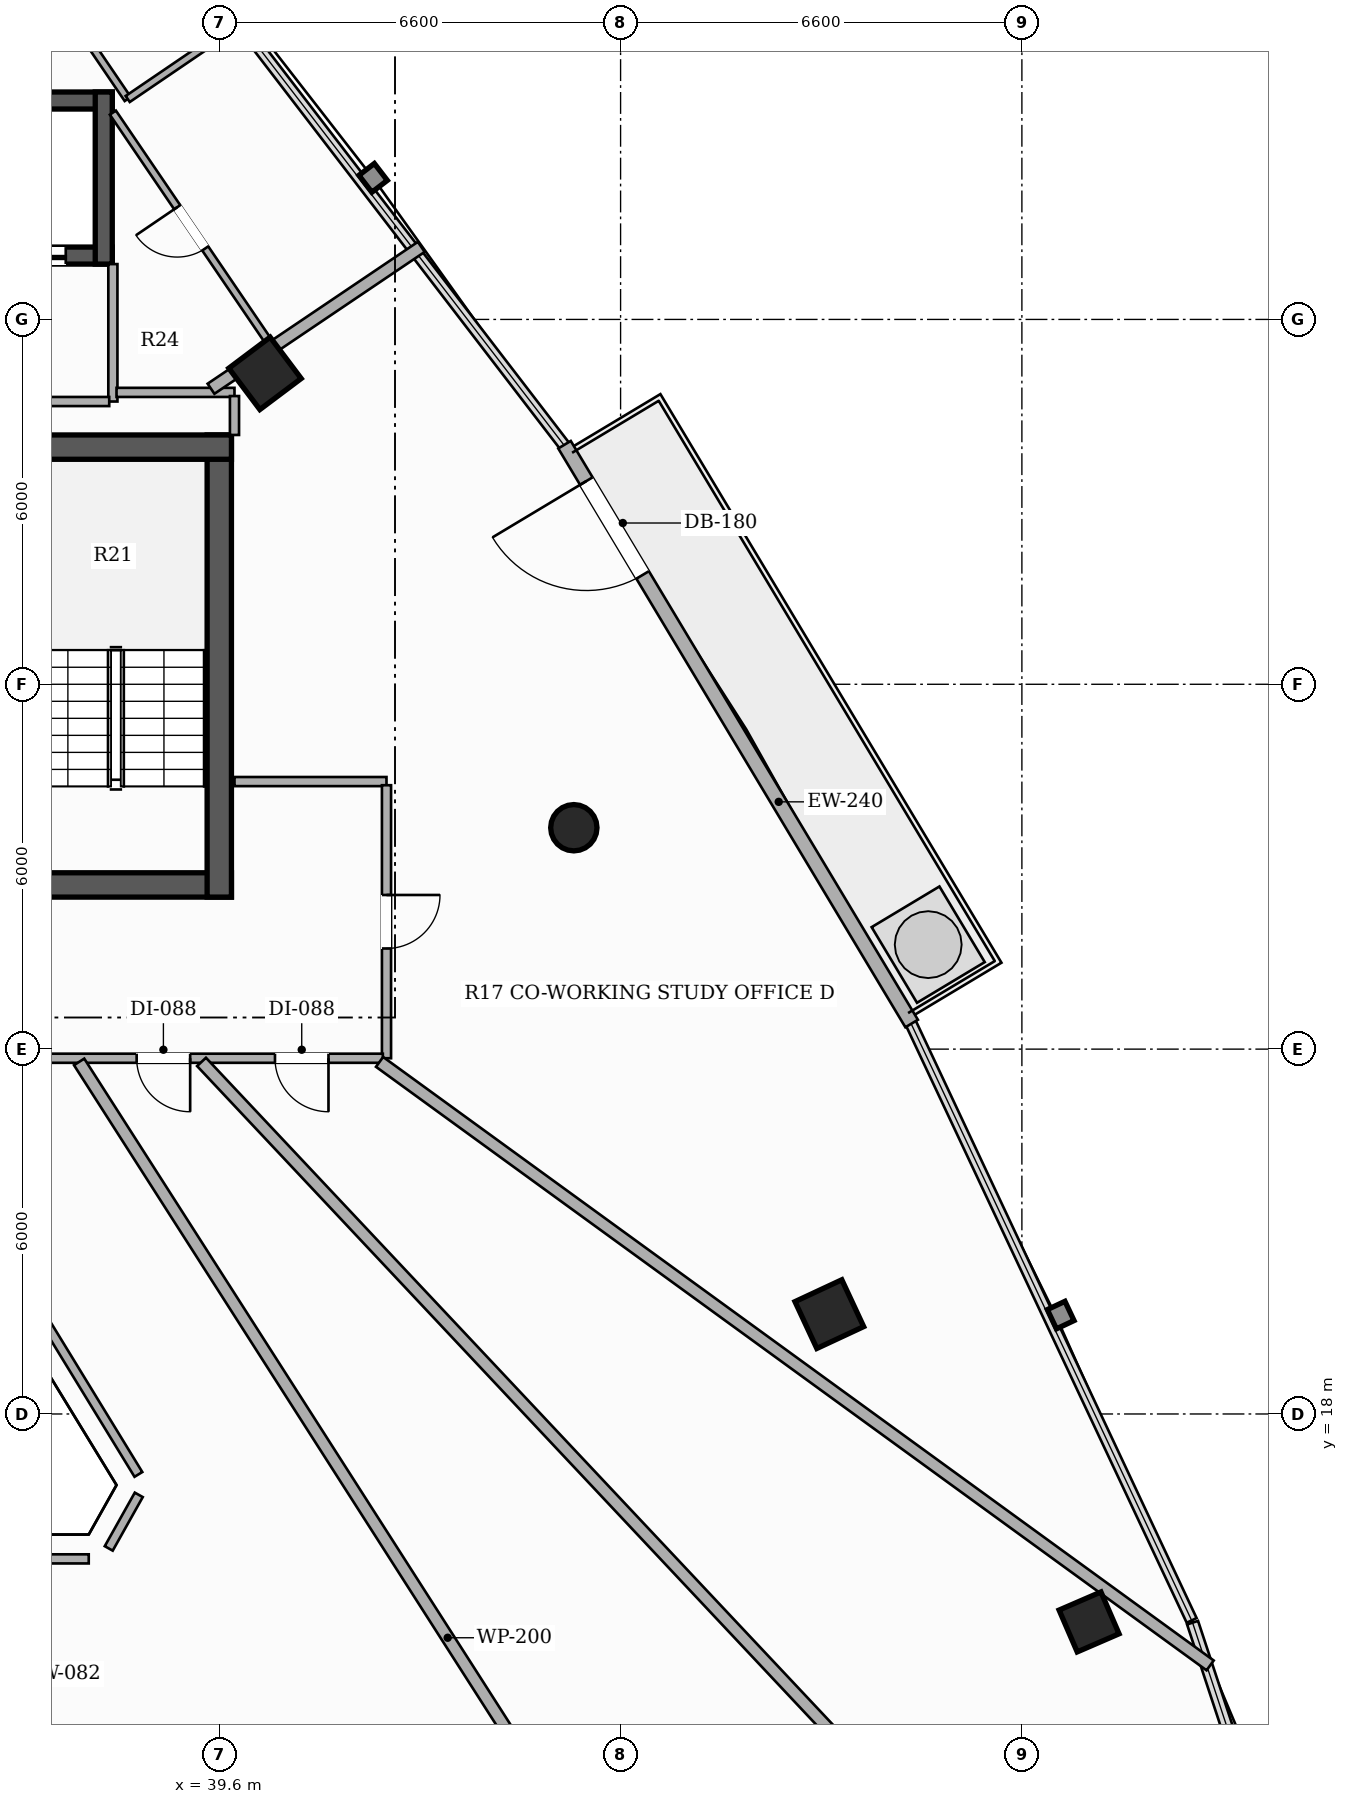
"""IFC4 building model, lengths in metres.
Left out: names, types, materials, properties, quantities, classifications, styles, units other than length and angle.
Written with IfcOpenShell. Run it as: python <this file> out.ifc"""

import sys

from ifc_helpers import new_model, si_unit, direction, frame, frame_2d, origin, origin_2d, place, context, subcontext, project, spatial, rectangle, hollow_rectangle, hollow_circle, extrude, element, fill, save


model = new_model("IFC4")
c1 = context("Model", 3, precision=1e-05, world=origin(), true_north=direction((0.0, 1.0)))
c2 = subcontext(c1, "Body", "Model", "MODEL_VIEW")
j1 = project(units=[si_unit("LENGTHUNIT", "METRE"), si_unit("PLANEANGLEUNIT", "RADIAN")], contexts=[c1])
p1 = place(None, origin())
s1 = spatial("IfcSite", under=j1, at=p1, CompositionType="ELEMENT")
p2 = place(p1, origin())
s2 = spatial("IfcBuilding", under=s1, at=p2, CompositionType="ELEMENT")
p3 = place(p2, frame((0.0, 0.0, 167.15)))
s3 = spatial("IfcBuildingStorey", under=s2, at=p3, CompositionType="ELEMENT", Elevation=167.15)
p4 = place(p3, frame((26.2, 26.7, 0.0), z_axis=(0.0, 0.0, 1.0), x_axis=(1.0, 0.0, 0.0)))
e1 = element("IfcWall", 1, at=p4, inside=s3, PredefinedType="SHEAR", context=c2, shape_type="SweptSolid", body=[
    extrude(rectangle(XDim=13.6, YDim=0.4, at=frame_2d((6.8, 0.0))), origin(), (0.0, 0.0, 1.0), 3.3),
])
p5 = place(p4, frame((4.35, 0.0, 0.0)))
e2 = element("IfcOpeningElement", 2, at=p5, cuts=e1, PredefinedType="OPENING", context=c2, shape_type="SweptSolid", body=[
    extrude(rectangle(XDim=1.05, YDim=2.15, at=frame_2d((0.525, 1.075))), frame((0.0, 0.21, 0.0), z_axis=(0.0, -1.0, 0.0), x_axis=(1.0, 0.0, 0.0)), (0.0, 0.0, 1.0), 0.42),
])
p6 = place(p4, frame((8.3, 0.0, 0.0)))
e3 = element("IfcOpeningElement", 3, at=p6, cuts=e1, PredefinedType="OPENING", context=c2, shape_type="SweptSolid", body=[
    extrude(rectangle(XDim=1.05, YDim=2.15, at=frame_2d((0.525, 1.075))), frame((0.0, 0.21, 0.0), z_axis=(0.0, -1.0, 0.0), x_axis=(1.0, 0.0, 0.0)), (0.0, 0.0, 1.0), 0.42),
])
p7 = place(p3, frame((39.6, 26.5, 0.0), z_axis=(0.0, 0.0, 1.0), x_axis=(0.0, 1.0, 0.0)))
e4 = element("IfcWall", 4, at=p7, inside=s3, PredefinedType="SHEAR", context=c2, shape_type="SweptSolid", body=[
    extrude(rectangle(XDim=7.6, YDim=0.4, at=frame_2d((3.8, 0.0))), origin(), (0.0, 0.0, 1.0), 3.3),
])
p8 = place(p3, frame((36.12, 33.9, 0.0), z_axis=(0.0, 0.0, 1.0), x_axis=(1.0, 0.0, 0.0)))
e5 = element("IfcWall", 5, at=p8, inside=s3, PredefinedType="SHEAR", context=c2, shape_type="SweptSolid", body=[
    extrude(rectangle(XDim=3.68, YDim=0.4, at=frame_2d((1.84, 0.0))), origin(), (0.0, 0.0, 1.0), 3.3),
])
p9 = place(p3, frame((37.84, 37.05, 0.0), z_axis=(0.0, 0.0, 1.0), x_axis=(-1.0, 0.0, 0.0)))
e6 = element("IfcWall", 6, at=p9, inside=s3, PredefinedType="SHEAR", context=c2, shape_type="SweptSolid", body=[
    extrude(rectangle(XDim=9.68, YDim=0.28, at=frame_2d((4.84, 0.0))), origin(), (0.0, 0.0, 1.0), 3.3),
])
p10 = place(p9, frame((7.815, 0.0, 0.0)))
e7 = element("IfcOpeningElement", 7, at=p10, cuts=e6, PredefinedType="OPENING", context=c2, shape_type="SweptSolid", body=[
    extrude(rectangle(XDim=1.1, YDim=2.2, at=frame_2d((0.55, 1.1))), frame((0.0, 0.15, 0.0), z_axis=(0.0, -1.0, 0.0), x_axis=(1.0, 0.0, 0.0)), (0.0, 0.0, 1.0), 0.3),
])
p11 = place(p9, frame((0.765, 0.0, 0.0)))
e8 = element("IfcOpeningElement", 8, at=p11, cuts=e6, PredefinedType="OPENING", context=c2, shape_type="SweptSolid", body=[
    extrude(rectangle(XDim=1.1, YDim=2.2, at=frame_2d((0.55, 1.1))), frame((0.0, 0.15, 0.0), z_axis=(0.0, -1.0, 0.0), x_axis=(1.0, 0.0, 0.0)), (0.0, 0.0, 1.0), 0.3),
])
p12 = place(p3, frame((28.16, 39.6, 0.0), z_axis=(0.0, 0.0, 1.0), x_axis=(1.0, 0.0, 0.0)))
e9 = element("IfcWall", 9, at=p12, inside=s3, PredefinedType="SHEAR", context=c2, shape_type="SweptSolid", body=[
    extrude(rectangle(XDim=9.68, YDim=0.28, at=frame_2d((4.84, 0.0))), origin(), (0.0, 0.0, 1.0), 3.3),
])
p13 = place(p3, frame((37.7, 36.91, 0.0), z_axis=(0.0, 0.0, 1.0), x_axis=(0.0, 1.0, 0.0)))
e10 = element("IfcWall", 10, at=p13, inside=s3, PredefinedType="SHEAR", context=c2, shape_type="SweptSolid", body=[
    extrude(rectangle(XDim=2.83, YDim=0.28, at=frame_2d((1.415, 0.0))), origin(), (0.0, 0.0, 1.0), 3.3),
])
p14 = place(p3, frame((49.633, 19.642, 0.0), z_axis=(0.0, 0.0, 1.0), x_axis=(-0.422618261741, 0.906307787037, 0.0)))
e11 = element("IfcColumn", 11, at=p14, inside=s3, PredefinedType="COLUMN", context=c2, shape_type="SweptSolid", body=[
    extrude(hollow_rectangle(XDim=0.85, YDim=0.85, WallThickness=0.028, at=origin_2d()), origin(), (0.0, 0.0, 1.0), 3.3),
])
p15 = place(p3, frame((45.431, 27.641, 0.0), z_axis=(0.0, 0.0, 1.0), x_axis=(1.0, 0.0, 0.0)))
e12 = element("IfcColumn", 12, at=p15, inside=s3, PredefinedType="COLUMN", context=c2, shape_type="SweptSolid", body=[
    extrude(hollow_circle(Radius=0.381, WallThickness=0.022, at=origin_2d()), origin(), (0.0, 0.0, 1.0), 3.3),
])
p16 = place(p3, frame((40.352, 35.113, 0.0), z_axis=(0.0, 0.0, 1.0), x_axis=(-0.600420225326, 0.799684658487, 0.0)))
e13 = element("IfcColumn", 13, at=p16, inside=s3, PredefinedType="COLUMN", context=c2, shape_type="SweptSolid", body=[
    extrude(hollow_rectangle(XDim=0.85, YDim=0.85, WallThickness=0.028, at=origin_2d()), origin(), (0.0, 0.0, 1.0), 3.3),
])
p17 = place(p3, frame((53.905, 14.58, 0.0), z_axis=(0.0, 0.0, 1.0), x_axis=(-0.397147890635, 0.917754625684, 0.0)))
e14 = element("IfcColumn", 14, at=p17, inside=s3, PredefinedType="COLUMN", context=c2, shape_type="SweptSolid", body=[
    extrude(hollow_rectangle(XDim=0.75, YDim=0.75, WallThickness=0.025, at=origin_2d()), origin(), (0.0, 0.0, 1.0), 3.3),
])
p18 = place(p3, frame((50.987, 24.421, 0.0), z_axis=(0.0, 0.0, 1.0), x_axis=(-0.514334017412, 0.85758994778, 0.0)))
e15 = element("IfcWall", 15, at=p18, inside=s3, PredefinedType="SOLIDWALL", context=c2, shape_type="SweptSolid", body=[
    extrude(rectangle(XDim=11.1, YDim=0.24, at=frame_2d((5.55, 0.0))), origin(), (0.0, 0.0, 1.0), 2.624),
])
p19 = place(p18, frame((8.602, 0.0, 0.0)))
e16 = element("IfcOpeningElement", 16, at=p19, cuts=e15, PredefinedType="OPENING", context=c2, shape_type="SweptSolid", body=[
    extrude(rectangle(XDim=1.8, YDim=2.2, at=frame_2d((0.9, 1.1))), frame((0.0, 0.13, 0.0), z_axis=(0.0, -1.0, 0.0), x_axis=(1.0, 0.0, 0.0)), (0.0, 0.0, 1.0), 0.26),
])
p20 = place(p3, frame((37.85, 34.65, 0.0), z_axis=(0.0, 0.0, 1.0), x_axis=(0.0, 1.0, 0.0)))
e17 = element("IfcWall", 17, at=p20, inside=s3, PredefinedType="PARTITIONING", context=c2, shape_type="SweptSolid", body=[
    extrude(rectangle(XDim=2.26, YDim=0.15, at=frame_2d((1.13, 0.0))), origin(), (0.0, 0.0, 1.0), 3.06),
])
p21 = place(p3, frame((36.385, 34.65, 0.0), z_axis=(0.0, 0.0, 1.0), x_axis=(1.0, 0.0, 0.0)))
e18 = element("IfcWall", 18, at=p21, inside=s3, PredefinedType="PARTITIONING", context=c2, shape_type="SweptSolid", body=[
    extrude(rectangle(XDim=1.405, YDim=0.15, at=frame_2d((0.703, 0.0))), origin(), (0.0, 0.0, 1.0), 2.425),
])
p22 = place(p3, frame((39.85, 28.4, 0.0), z_axis=(0.0, 0.0, 1.0), x_axis=(1.0, 0.0, 0.0)))
e19 = element("IfcWall", 19, at=p22, inside=s3, PredefinedType="PARTITIONING", context=c2, shape_type="SweptSolid", body=[
    extrude(rectangle(XDim=2.5, YDim=0.15, at=frame_2d((1.25, 0.0))), origin(), (0.0, 0.0, 1.0), 2.721),
])
p23 = place(p3, frame((42.35, 28.34, 0.0), z_axis=(0.0, 0.0, 1.0), x_axis=(0.0, -1.0, 0.0)))
e20 = element("IfcWall", 20, at=p23, inside=s3, PredefinedType="PARTITIONING", context=c2, shape_type="SweptSolid", body=[
    extrude(rectangle(XDim=4.49, YDim=0.15, at=frame_2d((2.245, 0.0))), origin(), (0.0, 0.0, 1.0), 2.721),
])
p24 = place(p23, frame((1.805, 0.0, 0.0)))
e21 = element("IfcOpeningElement", 21, at=p24, cuts=e20, PredefinedType="OPENING", context=c2, shape_type="SweptSolid", body=[
    extrude(rectangle(XDim=0.88, YDim=2.1, at=frame_2d((0.44, 1.05))), frame((0.0, 0.085, 0.0), z_axis=(0.0, -1.0, 0.0), x_axis=(1.0, 0.0, 0.0)), (0.0, 0.0, 1.0), 0.17),
])
p25 = place(p3, frame((42.29, 23.85, 0.0), z_axis=(0.0, 0.0, 1.0), x_axis=(-1.0, 0.0, 0.0)))
e22 = element("IfcWall", 22, at=p25, inside=s3, PredefinedType="PARTITIONING", context=c2, shape_type="SweptSolid", body=[
    extrude(rectangle(XDim=8.202, YDim=0.15, at=frame_2d((4.101, 0.0))), origin(), (0.0, 0.0, 1.0), 2.492),
])
p26 = place(p25, frame((5.987, 0.0, 0.0)))
e23 = element("IfcOpeningElement", 23, at=p26, cuts=e22, PredefinedType="OPENING", context=c2, shape_type="SweptSolid", body=[
    extrude(rectangle(XDim=0.92, YDim=2.15, at=frame_2d((0.46, 1.075))), frame((0.0, 0.085, 0.0), z_axis=(0.0, -1.0, 0.0), x_axis=(1.0, 0.0, 0.0)), (0.0, 0.0, 1.0), 0.17),
])
p27 = place(p25, frame((0.894, 0.0, 0.0)))
e24 = element("IfcOpeningElement", 24, at=p27, cuts=e22, PredefinedType="OPENING", context=c2, shape_type="SweptSolid", body=[
    extrude(rectangle(XDim=0.88, YDim=2.1, at=frame_2d((0.44, 1.05))), frame((0.0, 0.085, 0.0), z_axis=(0.0, -1.0, 0.0), x_axis=(1.0, 0.0, 0.0)), (0.0, 0.0, 1.0), 0.17),
])
p28 = place(p25, frame((3.169, 0.0, 0.0)))
e25 = element("IfcOpeningElement", 25, at=p28, cuts=e22, PredefinedType="OPENING", context=c2, shape_type="SweptSolid", body=[
    extrude(rectangle(XDim=0.88, YDim=2.1, at=frame_2d((0.44, 1.05))), frame((0.0, 0.085, 0.0), z_axis=(0.0, -1.0, 0.0), x_axis=(1.0, 0.0, 0.0)), (0.0, 0.0, 1.0), 0.17),
])
p29 = place(p3, frame((37.91, 34.8, 0.0), z_axis=(0.0, 0.0, 1.0), x_axis=(1.0, 0.0, 0.0)))
e26 = element("IfcWall", 26, at=p29, inside=s3, PredefinedType="PARTITIONING", context=c2, shape_type="SweptSolid", body=[
    extrude(rectangle(XDim=1.94, YDim=0.15, at=frame_2d((0.97, 0.0))), origin(), (0.0, 0.0, 1.0), 2.721),
])
p30 = place(p3, frame((39.85, 34.74, 0.0), z_axis=(0.0, 0.0, 1.0), x_axis=(0.0, -1.0, 0.0)))
e27 = element("IfcWall", 27, at=p30, inside=s3, PredefinedType="PARTITIONING", context=c2, shape_type="SweptSolid", body=[
    extrude(rectangle(XDim=0.64, YDim=0.15, at=frame_2d((0.32, 0.0))), origin(), (0.0, 0.0, 1.0), 2.721),
])
p31 = place(p3, frame((34.119, 23.79, 0.0), z_axis=(0.0, 0.0, 1.0), x_axis=(0.521942869651, -0.852980445744, 0.0)))
e28 = element("IfcWall", 28, at=p31, inside=s3, PredefinedType="PARTITIONING", context=c2, shape_type="SweptSolid", body=[
    extrude(rectangle(XDim=7.953, YDim=0.15, at=frame_2d((3.977, 0.0))), origin(), (0.0, 0.0, 1.0), 2.721),
])
p32 = place(p3, frame((38.276, 16.67, 0.0), z_axis=(0.0, 0.0, 1.0), x_axis=(-0.489067077696, -0.872246177127, 0.0)))
e29 = element("IfcWall", 29, at=p32, inside=s3, PredefinedType="PARTITIONING", context=c2, shape_type="SweptSolid", body=[
    extrude(rectangle(XDim=1.01, YDim=0.15, at=frame_2d((0.505, 0.0))), origin(), (0.0, 0.0, 1.0), 3.06),
])
p33 = place(p3, frame((37.453, 15.617, 0.0), z_axis=(0.0, 0.0, 1.0), x_axis=(-1.0, 0.0, 0.0)))
e30 = element("IfcWall", 30, at=p33, inside=s3, PredefinedType="PARTITIONING", context=c2, shape_type="SweptSolid", body=[
    extrude(rectangle(XDim=8.906, YDim=0.15, at=frame_2d((4.453, 0.0))), origin(), (0.0, 0.0, 1.0), 2.721),
])
p34 = place(p3, frame((37.295, 23.79, 0.0), z_axis=(0.0, 0.0, 1.0), x_axis=(0.539100523601, -0.842241429433, 0.0)))
e31 = element("IfcWall", 31, at=p34, inside=s3, PredefinedType="PARTITIONING", context=c2, shape_type="SweptSolid", body=[
    extrude(rectangle(XDim=22.488, YDim=0.2, at=frame_2d((11.244, 0.0))), origin(), (0.0, 0.0, 1.0), 2.413),
])
p35 = place(p3, frame((39.464, 34.86, 0.0), z_axis=(0.0, 0.0, 1.0), x_axis=(0.828976210701, 0.559283865395, 0.0)))
e32 = element("IfcWall", 32, at=p35, inside=s3, PredefinedType="PARTITIONING", context=c2, shape_type="SweptSolid", body=[
    extrude(rectangle(XDim=4.171, YDim=0.2, at=frame_2d((2.086, 0.0))), origin(), (0.0, 0.0, 1.0), 2.413),
])
p36 = place(p3, frame((55.896, 13.865, 0.0), z_axis=(0.0, 0.0, 1.0), x_axis=(-0.809001736781, 0.587806251995, 0.0)))
e33 = element("IfcWall", 33, at=p36, inside=s3, PredefinedType="PARTITIONING", context=c2, shape_type="SweptSolid", body=[
    extrude(rectangle(XDim=16.885, YDim=0.2, at=frame_2d((8.442, 0.0))), origin(), (0.0, 0.0, 1.0), 2.413),
])
p37 = place(p3, frame((56.122, 5.904, 0.0), z_axis=(0.0, 0.0, 1.0), x_axis=(-0.684934612975, 0.728604540165, 0.0)))
e34 = element("IfcWall", 34, at=p37, inside=s3, PredefinedType="PARTITIONING", context=c2, shape_type="SweptSolid", body=[
    extrude(rectangle(XDim=24.548, YDim=0.2, at=frame_2d((12.274, 0.0))), origin(), (0.0, 0.0, 1.0), 2.413),
])
p38 = place(p3, frame((40.427, 35.612, 0.0), z_axis=(0.0, 0.0, 1.0), x_axis=(-0.562385802303, 0.826874965982, 0.0)))
e35 = element("IfcWall", 35, at=p38, inside=s3, PredefinedType="PARTITIONING", context=c2, shape_type="SweptSolid", body=[
    extrude(rectangle(XDim=4.582, YDim=0.12, at=frame_2d((2.291, 0.0))), origin(), (0.0, 0.0, 1.0), 2.413),
])
p39 = place(p38, frame((1.881, 0.0, 0.0)))
e36 = element("IfcOpeningElement", 36, at=p39, cuts=e35, PredefinedType="OPENING", context=c2, shape_type="SweptSolid", body=[
    extrude(rectangle(XDim=0.82, YDim=2.1, at=frame_2d((0.41, 1.05))), frame((0.0, 0.07, 0.0), z_axis=(0.0, -1.0, 0.0), x_axis=(1.0, 0.0, 0.0)), (0.0, 0.0, 1.0), 0.14),
])
p40 = place(p3, frame((32.473, 47.892, 0.0), z_axis=(0.0, 0.0, 1.0), x_axis=(0.562273950157, -0.826951029369, 0.0)))
e37 = element("IfcWall", 37, at=p40, inside=s3, PredefinedType="PARTITIONING", context=c2, shape_type="SweptSolid", body=[
    extrude(rectangle(XDim=9.997, YDim=0.12, at=frame_2d((4.999, 0.0))), origin(), (0.0, 0.0, 1.0), 2.413),
])
p41 = place(p40, frame((4.558, 0.0, 0.0)))
e38 = element("IfcOpeningElement", 38, at=p41, cuts=e37, PredefinedType="OPENING", context=c2, shape_type="SweptSolid", body=[
    extrude(rectangle(XDim=0.88, YDim=2.1, at=frame_2d((0.44, 1.05))), frame((0.0, 0.07, 0.0), z_axis=(0.0, -1.0, 0.0), x_axis=(1.0, 0.0, 0.0)), (0.0, 0.0, 1.0), 0.14),
])
p42 = place(p3, frame((38.094, 39.625, 0.0), z_axis=(0.0, 0.0, 1.0), x_axis=(0.826798473187, 0.562498253096, 0.0)))
e39 = element("IfcWall", 39, at=p42, inside=s3, PredefinedType="PARTITIONING", context=c2, shape_type="SweptSolid", body=[
    extrude(rectangle(XDim=2.377, YDim=0.12, at=frame_2d((1.188, 0.0))), origin(), (0.0, 0.0, 1.0), 2.413),
])
p43 = place(p19, origin())
e40 = element("IfcDoor", 40, at=p43, inside=s3, OperationType="SINGLE_SWING_RIGHT", PredefinedType="DOOR", context=c2, shape_type="SweptSolid", body=[
    extrude(rectangle(XDim=1.8, YDim=2.2, at=frame_2d((0.9, 1.1))), frame((0.0, 0.025, 0.0), z_axis=(0.0, -1.0, 0.0), x_axis=(1.0, 0.0, 0.0)), (0.0, 0.0, 1.0), 0.05),
])
fill(e16, e40)
p44 = place(p11, origin())
e41 = element("IfcDoor", 41, at=p44, inside=s3, OperationType="DOUBLE_DOOR_SLIDING", PredefinedType="DOOR", context=c2, shape_type="SweptSolid", body=[
    extrude(rectangle(XDim=1.1, YDim=2.2, at=frame_2d((0.55, 1.1))), frame((0.0, 0.025, 0.0), z_axis=(0.0, -1.0, 0.0), x_axis=(1.0, 0.0, 0.0)), (0.0, 0.0, 1.0), 0.05),
])
fill(e8, e41)
p45 = place(p24, origin())
e42 = element("IfcDoor", 42, at=p45, inside=s3, OperationType="SINGLE_SWING_LEFT", PredefinedType="DOOR", context=c2, shape_type="SweptSolid", body=[
    extrude(rectangle(XDim=0.88, YDim=2.1, at=frame_2d((0.44, 1.05))), frame((0.0, 0.025, 0.0), z_axis=(0.0, -1.0, 0.0), x_axis=(1.0, 0.0, 0.0)), (0.0, 0.0, 1.0), 0.05),
])
fill(e21, e42)
p46 = place(p39, origin())
e43 = element("IfcDoor", 43, at=p46, inside=s3, OperationType="SINGLE_SWING_RIGHT", PredefinedType="DOOR", context=c2, shape_type="SweptSolid", body=[
    extrude(rectangle(XDim=0.82, YDim=2.1, at=frame_2d((0.41, 1.05))), frame((0.0, 0.025, 0.0), z_axis=(0.0, -1.0, 0.0), x_axis=(1.0, 0.0, 0.0)), (0.0, 0.0, 1.0), 0.05),
])
fill(e36, e43)
p47 = place(p27, origin())
e44 = element("IfcDoor", 44, at=p47, inside=s3, OperationType="SINGLE_SWING_LEFT", PredefinedType="DOOR", context=c2, shape_type="SweptSolid", body=[
    extrude(rectangle(XDim=0.88, YDim=2.1, at=frame_2d((0.44, 1.05))), frame((0.0, 0.025, 0.0), z_axis=(0.0, -1.0, 0.0), x_axis=(1.0, 0.0, 0.0)), (0.0, 0.0, 1.0), 0.05),
])
fill(e24, e44)
p48 = place(p28, origin())
e45 = element("IfcDoor", 45, at=p48, inside=s3, OperationType="SINGLE_SWING_LEFT", PredefinedType="DOOR", context=c2, shape_type="SweptSolid", body=[
    extrude(rectangle(XDim=0.88, YDim=2.1, at=frame_2d((0.44, 1.05))), frame((0.0, 0.025, 0.0), z_axis=(0.0, -1.0, 0.0), x_axis=(1.0, 0.0, 0.0)), (0.0, 0.0, 1.0), 0.05),
])
fill(e25, e45)
save(model, sys.argv[1])
